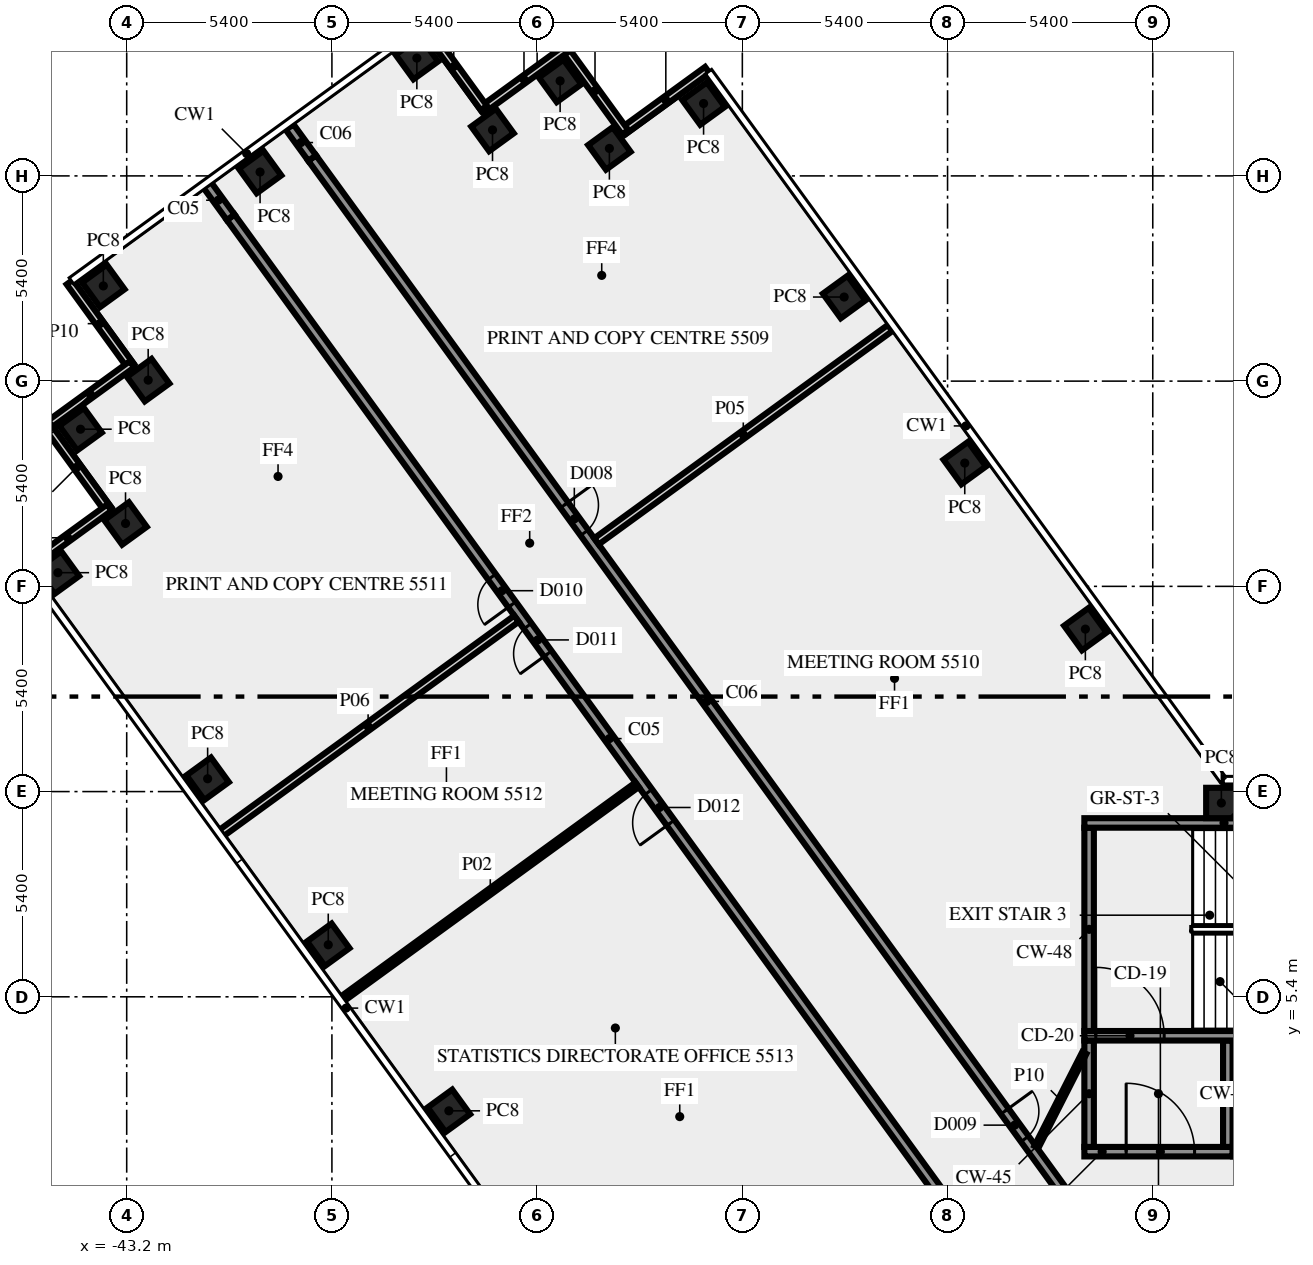
"""IFC4 building model, lengths in metres.
Left out: names, types, materials, properties, quantities, classifications, styles, units other than length and angle.
Written with IfcOpenShell. Run it as: python <this file> out.ifc"""

import sys

from ifc_helpers import new_model, si_unit, direction, frame, frame_2d, origin, origin_2d, place, context, subcontext, project, spatial, rectangle, extrude, element, fill, save


model = new_model("IFC4")
c1 = context("Model", 3, precision=1e-05, world=origin(), true_north=direction((0.0, 1.0)))
c2 = subcontext(c1, "Body", "Model", "MODEL_VIEW")
j1 = project(units=[si_unit("LENGTHUNIT", "METRE"), si_unit("PLANEANGLEUNIT", "RADIAN")], contexts=[c1])
p1 = place(None, origin())
s1 = spatial("IfcSite", under=j1, at=p1, CompositionType="ELEMENT")
p2 = place(p1, origin())
s2 = spatial("IfcBuilding", under=s1, at=p2, CompositionType="ELEMENT")
p3 = place(p2, frame((0.0, 0.0, 234.0)))
s3 = spatial("IfcBuildingStorey", under=s2, at=p3, CompositionType="ELEMENT", Elevation=234.0)
for number, where, z_axis, x_axis in (
    (1, (-17.974, 15.075, 0.0), (0.0, 0.0, 1.0), (-0.588, 0.809, 0.0)),
    (2, (-21.147, 19.444, 0.0), (0.0, 0.0, 1.0), (-0.588, 0.809, 0.0)),
    (3, (-24.321, 23.812, 0.0), (0.0, 0.0, 1.0), (-0.588, 0.809, 0.0)),
    (4, (-28.02, 28.905, 0.0), (0.0, 0.0, 1.0), (-0.809, -0.588, 0.0)),
    (5, (-30.499, 27.723, 0.0), (0.0, 0.0, 1.0), (-0.809, -0.588, 0.0)),
    (6, (-31.795, 29.5, 0.0), (0.0, 0.0, 1.0), (-0.588, 0.809, 0.0)),
    (7, (-33.574, 28.209, 0.0), (0.0, 0.0, 1.0), (-0.588, 0.809, 0.0)),
    (8, (-35.565, 30.1, 0.0), (0.0, 0.0, 1.0), (-0.809, -0.588, 0.0)),
    (9, (-39.691, 27.102, 0.0), (0.0, 0.0, 1.0), (-0.809, -0.588, 0.0)),
    (10, (-43.815, 24.105, 0.0), (0.0, 0.0, 1.0), (-0.809, -0.588, 0.0)),
    (11, (-42.635, 21.626, 0.0), (0.0, 0.0, 1.0), (-0.809, -0.588, 0.0)),
    (12, (-44.415, 20.335, 0.0), (0.0, 0.0, 1.0), (0.588, -0.809, 0.0)),
    (13, (-43.231, 17.854, 0.0), (0.0, 0.0, 1.0), (0.588, -0.809, 0.0)),
    (14, (-45.01, 16.56, 0.0), (0.0, 0.0, 1.0), (0.588, -0.809, 0.0)),
    (15, (-41.07, 11.137, 0.0), (0.0, 0.0, 1.0), (0.588, -0.809, 0.0)),
    (16, (-37.896, 6.769, 0.0), (0.0, 0.0, 1.0), (0.588, -0.809, 0.0)),
    (17, (-34.722, 2.4, 0.0), (0.0, 0.0, 1.0), (0.588, -0.809, 0.0)),
    (18, (-14.395, 10.5, 0.0), (0.0, 0.0, 1.0), (-1.0, 0.0, 0.0)),
):
    element("IfcColumn", number, at=place(p3, frame(where, z_axis=z_axis, x_axis=x_axis)), inside=s3, PredefinedType="COLUMN", context=c2, shape_type="SweptSolid", body=[
        extrude(rectangle(XDim=0.8, YDim=0.8, at=origin_2d()), origin(), (0.0, 0.0, 1.0), 3.65),
    ])
for number, where, z_axis, x_axis in (
    (19, (-27.921, 29.787, 0.0), (0.0, 0.0, 1.0), (-0.809, -0.588, 0.0)),
    (20, (-30.083, 28.149, 0.0), (0.0, 0.0, 1.0), (-0.588, 0.809, 0.0)),
    (21, (-31.654, 30.331, 0.0), (0.0, 0.0, 1.0), (-0.809, -0.588, 0.0)),
    (22, (-33.801, 28.786, 0.0), (0.0, 0.0, 1.0), (-0.588, 0.809, 0.0)),
    (23, (-44.699, 24.205, 0.0), (0.0, 0.0, 1.0), (0.588, -0.809, 0.0)),
    (24, (-43.061, 22.043, 0.0), (0.0, 0.0, 1.0), (-0.809, -0.588, 0.0)),
    (25, (-45.296, 20.434, 0.0), (0.0, 0.0, 1.0), (0.588, -0.809, 0.0)),
    (26, (-43.658, 18.272, 0.0), (0.0, 0.0, 1.0), (-0.809, -0.588, 0.0)),
):
    element("IfcWall", number, at=place(p3, frame(where, z_axis=z_axis, x_axis=x_axis)), inside=s3, PredefinedType="SOLIDWALL", context=c2, shape_type="SweptSolid", body=[
        extrude(rectangle(XDim=2.7, YDim=0.2, at=frame_2d((1.35, 0.0))), origin(), (0.0, 0.0, 1.0), 3.65),
    ])
p4 = place(p3, frame((-18.0, 1.325, 0.0), z_axis=(0.0, 0.0, 1.0), x_axis=(1.0, 0.0, 0.0)))
e27 = element("IfcWall", 27, at=p4, inside=s3, PredefinedType="SHEAR", context=c2, shape_type="SweptSolid", body=[
    extrude(rectangle(XDim=3.9, YDim=0.25, at=frame_2d((1.95, 0.0))), origin(), (0.0, 0.0, 1.0), 3.65),
])
p5 = place(p4, frame((1.1, 0.0, 0.0)))
e28 = element("IfcOpeningElement", 28, at=p5, cuts=e27, PredefinedType="OPENING", context=c2, shape_type="SweptSolid", body=[
    extrude(rectangle(XDim=1.8, YDim=2.1, at=frame_2d((0.9, 1.05))), frame((0.0, 0.135, 0.0), z_axis=(0.0, -1.0, 0.0), x_axis=(1.0, 0.0, 0.0)), (0.0, 0.0, 1.0), 0.27),
])
for number, where, z_axis, x_axis in (
    (29, (-17.875, 1.45, 0.0), (0.0, 0.0, 1.0), (0.0, 1.0, 0.0)),
    (30, (-14.225, 1.45, 0.0), (0.0, 0.0, 1.0), (0.0, 1.0, 0.0)),
):
    element("IfcWall", number, at=place(p3, frame(where, z_axis=z_axis, x_axis=x_axis)), inside=s3, PredefinedType="SHEAR", context=c2, shape_type="SweptSolid", body=[
        extrude(rectangle(XDim=2.8, YDim=0.25, at=frame_2d((1.4, 0.0))), origin(), (0.0, 0.0, 1.0), 3.65),
    ])
p6 = place(p3, frame((-18.0, 4.375, 0.0), z_axis=(0.0, 0.0, 1.0), x_axis=(1.0, 0.0, 0.0)))
e31 = element("IfcWall", 31, at=p6, inside=s3, PredefinedType="SHEAR", context=c2, shape_type="SweptSolid", body=[
    extrude(rectangle(XDim=10.5, YDim=0.25, at=frame_2d((5.25, 0.0))), origin(), (0.0, 0.0, 1.0), 3.65),
])
p7 = place(p6, frame((0.3, 0.0, 0.0)))
e32 = element("IfcOpeningElement", 32, at=p7, cuts=e31, PredefinedType="OPENING", context=c2, shape_type="SweptSolid", body=[
    extrude(rectangle(XDim=1.8, YDim=2.1, at=frame_2d((0.9, 1.05))), frame((0.0, 0.135, 0.0), z_axis=(0.0, -1.0, 0.0), x_axis=(1.0, 0.0, 0.0)), (0.0, 0.0, 1.0), 0.27),
])
p8 = place(p3, frame((-17.875, 4.5, 0.0), z_axis=(0.0, 0.0, 1.0), x_axis=(0.0, 1.0, 0.0)))
e33 = element("IfcWall", 33, at=p8, inside=s3, PredefinedType="SHEAR", context=c2, shape_type="SweptSolid", body=[
    extrude(rectangle(XDim=5.35, YDim=0.25, at=frame_2d((2.675, 0.0))), origin(), (0.0, 0.0, 1.0), 3.65),
])
p9 = place(p3, frame((-18.0, 9.975, 0.0), z_axis=(0.0, 0.0, 1.0), x_axis=(1.0, 0.0, 0.0)))
e34 = element("IfcWall", 34, at=p9, inside=s3, PredefinedType="SHEAR", context=c2, shape_type="SweptSolid", body=[
    extrude(rectangle(XDim=10.5, YDim=0.25, at=frame_2d((5.25, 0.0))), origin(), (0.0, 0.0, 1.0), 3.65),
])
p10 = place(p9, frame((4.5, 0.0, 1.0)))
e35 = element("IfcOpeningElement", 35, at=p10, cuts=e34, PredefinedType="OPENING", context=c2, shape_type="SweptSolid", body=[
    extrude(rectangle(XDim=1.2, YDim=1.2, at=frame_2d((0.6, 0.6))), frame((0.0, 0.135, 0.0), z_axis=(0.0, -1.0, 0.0), x_axis=(1.0, 0.0, 0.0)), (0.0, 0.0, 1.0), 0.27),
])
p11 = place(p3, frame((-20.531, -1.523, 0.0), z_axis=(0.0, 0.0, 1.0), x_axis=(-0.587781654618, 0.809019608226, 0.0)))
e36 = element("IfcWall", 36, at=p11, inside=s3, PredefinedType="SOLIDWALL", context=c2, shape_type="SweptSolid", body=[
    extrude(rectangle(XDim=33.911, YDim=0.25, at=frame_2d((16.956, 0.0))), origin(), (0.0, 0.0, 1.0), 3.65),
])
p12 = place(p11, frame((14.216, 0.0, 0.0)))
e37 = element("IfcOpeningElement", 37, at=p12, cuts=e36, PredefinedType="OPENING", context=c2, shape_type="SweptSolid", body=[
    extrude(rectangle(XDim=1.0, YDim=2.1, at=frame_2d((0.5, 1.05))), frame((0.0, 0.135, 0.0), z_axis=(0.0, -1.0, 0.0), x_axis=(1.0, 0.0, 0.0)), (0.0, 0.0, 1.0), 0.27),
])
p13 = place(p11, frame((19.715, 0.0, 0.0)))
e38 = element("IfcOpeningElement", 38, at=p13, cuts=e36, PredefinedType="OPENING", context=c2, shape_type="SweptSolid", body=[
    extrude(rectangle(XDim=0.9, YDim=2.1, at=frame_2d((0.45, 1.05))), frame((0.0, 0.135, 0.0), z_axis=(0.0, -1.0, 0.0), x_axis=(1.0, 0.0, 0.0)), (0.0, 0.0, 1.0), 0.27),
])
p14 = place(p11, frame((21.316, 0.0, 0.0)))
e39 = element("IfcOpeningElement", 39, at=p14, cuts=e36, PredefinedType="OPENING", context=c2, shape_type="SweptSolid", body=[
    extrude(rectangle(XDim=0.9, YDim=2.1, at=frame_2d((0.45, 1.05))), frame((0.0, 0.135, 0.0), z_axis=(0.0, -1.0, 0.0), x_axis=(1.0, 0.0, 0.0)), (0.0, 0.0, 1.0), 0.27),
])
p15 = place(p3, frame((-38.32, 27.469, 0.0), z_axis=(0.0, 0.0, 1.0), x_axis=(0.587788021768, -0.809014982226, 0.0)))
e40 = element("IfcWall", 40, at=p15, inside=s3, PredefinedType="SOLIDWALL", context=c2, shape_type="SweptSolid", body=[
    extrude(rectangle(XDim=35.344, YDim=0.25, at=frame_2d((17.672, 0.0))), origin(), (0.0, 0.0, 1.0), 3.65),
])
p16 = place(p15, frame((31.003, 0.0, 0.0)))
e41 = element("IfcOpeningElement", 41, at=p16, cuts=e40, PredefinedType="OPENING", context=c2, shape_type="SweptSolid", body=[
    extrude(rectangle(XDim=0.9, YDim=2.1, at=frame_2d((0.45, 1.05))), frame((0.0, 0.135, 0.0), z_axis=(0.0, -1.0, 0.0), x_axis=(1.0, 0.0, 0.0)), (0.0, 0.0, 1.0), 0.27),
])
p17 = place(p15, frame((11.286, 0.0, 0.0)))
e42 = element("IfcOpeningElement", 42, at=p17, cuts=e40, PredefinedType="OPENING", context=c2, shape_type="SweptSolid", body=[
    extrude(rectangle(XDim=0.9, YDim=2.1, at=frame_2d((0.45, 1.05))), frame((0.0, 0.135, 0.0), z_axis=(0.0, -1.0, 0.0), x_axis=(1.0, 0.0, 0.0)), (0.0, 0.0, 1.0), 0.27),
])
p18 = place(p3, frame((-29.769, 10.98, 0.0), z_axis=(0.0, 0.0, 1.0), x_axis=(-0.809048817734, -0.587741448702, 0.0)))
e43 = element("IfcWall", 43, at=p18, inside=s3, PredefinedType="PARTITIONING", context=c2, shape_type="SweptSolid", body=[
    extrude(rectangle(XDim=9.55, YDim=0.15, at=frame_2d((4.775, 0.0))), origin(), (0.0, 0.0, 1.0), 2.85),
])
p19 = place(p3, frame((-23.112, 22.998, 0.0), z_axis=(0.0, 0.0, 1.0), x_axis=(-0.809043311713, -0.587749027879, 0.0)))
e44 = element("IfcWall", 44, at=p19, inside=s3, PredefinedType="SOLIDWALL", context=c2, shape_type="SweptSolid", body=[
    extrude(rectangle(XDim=9.55, YDim=0.2, at=frame_2d((4.775, 0.0))), origin(), (0.0, 0.0, 1.0), 2.85),
])
p20 = place(p3, frame((-32.943, 15.349, 0.0), z_axis=(0.0, 0.0, 1.0), x_axis=(-0.80903787798, -0.587756507402, 0.0)))
e45 = element("IfcWall", 45, at=p20, inside=s3, PredefinedType="SOLIDWALL", context=c2, shape_type="SweptSolid", body=[
    extrude(rectangle(XDim=9.652, YDim=0.2, at=frame_2d((4.826, 0.0))), origin(), (0.0, 0.0, 1.0), 2.85),
])
p21 = place(p3, frame((-19.261, 1.45, 0.0), z_axis=(0.0, 0.0, 1.0), x_axis=(0.453950796792, 0.891026752736, 0.0)))
e46 = element("IfcWall", 46, at=p21, inside=s3, PredefinedType="PARTITIONING", context=c2, shape_type="SweptSolid", body=[
    extrude(rectangle(XDim=2.778, YDim=0.12, at=frame_2d((1.389, 0.0))), origin(), (0.0, 0.0, 1.0), 3.65),
])
p22 = place(p3, frame((-40.463, 25.911, 0.0), z_axis=(0.0, 0.0, 1.0), x_axis=(-0.587792454268, 0.809011761785, 0.0)))
e47 = element("IfcWall", 47, at=p22, inside=s3, PredefinedType="SOLIDWALL", context=c2, shape_type="SweptSolid", body=[
    extrude(rectangle(XDim=1.11, YDim=0.25, at=frame_2d((0.555, 0.0))), origin(), (0.0, 0.0, 1.0), 2.85),
])
p23 = place(p3, frame((-38.32, 27.469, 0.0), z_axis=(0.0, 0.0, 1.0), x_axis=(-0.587811913486, 0.808997623213, 0.0)))
e48 = element("IfcWall", 48, at=p23, inside=s3, PredefinedType="SOLIDWALL", context=c2, shape_type="SweptSolid", body=[
    extrude(rectangle(XDim=1.009, YDim=0.25, at=frame_2d((0.504, 0.0))), origin(), (0.0, 0.0, 1.0), 2.85),
])
p24 = place(p5, origin())
e49 = element("IfcDoor", 49, at=p24, inside=s3, OperationType="DOUBLE_DOOR_SINGLE_SWING", PredefinedType="DOOR", context=c2, shape_type="SweptSolid", body=[
    extrude(rectangle(XDim=1.8, YDim=2.1, at=frame_2d((0.9, 1.05))), frame((0.0, 0.025, 0.0), z_axis=(0.0, -1.0, 0.0), x_axis=(1.0, 0.0, 0.0)), (0.0, 0.0, 1.0), 0.05),
])
fill(e28, e49)
p25 = place(p7, origin())
e50 = element("IfcDoor", 50, at=p25, inside=s3, OperationType="DOUBLE_DOOR_SINGLE_SWING", PredefinedType="DOOR", context=c2, shape_type="SweptSolid", body=[
    extrude(rectangle(XDim=1.8, YDim=2.1, at=frame_2d((0.9, 1.05))), frame((0.0, 0.025, 0.0), z_axis=(0.0, -1.0, 0.0), x_axis=(1.0, 0.0, 0.0)), (0.0, 0.0, 1.0), 0.05),
])
fill(e32, e50)
p26 = place(p12, origin())
e51 = element("IfcDoor", 51, at=p26, inside=s3, OperationType="SINGLE_SWING_RIGHT", PredefinedType="DOOR", context=c2, shape_type="SweptSolid", body=[
    extrude(rectangle(XDim=1.0, YDim=2.1, at=frame_2d((0.5, 1.05))), frame((0.0, 0.025, 0.0), z_axis=(0.0, -1.0, 0.0), x_axis=(1.0, 0.0, 0.0)), (0.0, 0.0, 1.0), 0.05),
])
fill(e37, e51)
p27 = place(p16, origin())
e52 = element("IfcDoor", 52, at=p27, inside=s3, OperationType="SINGLE_SWING_RIGHT", PredefinedType="DOOR", context=c2, shape_type="SweptSolid", body=[
    extrude(rectangle(XDim=0.9, YDim=2.1, at=frame_2d((0.45, 1.05))), frame((0.0, 0.025, 0.0), z_axis=(0.0, -1.0, 0.0), x_axis=(1.0, 0.0, 0.0)), (0.0, 0.0, 1.0), 0.05),
])
fill(e41, e52)
p28 = place(p13, origin())
e53 = element("IfcDoor", 53, at=p28, inside=s3, OperationType="SINGLE_SWING_RIGHT", PredefinedType="DOOR", context=c2, shape_type="SweptSolid", body=[
    extrude(rectangle(XDim=0.9, YDim=2.1, at=frame_2d((0.45, 1.05))), frame((0.0, 0.025, 0.0), z_axis=(0.0, -1.0, 0.0), x_axis=(1.0, 0.0, 0.0)), (0.0, 0.0, 1.0), 0.05),
])
fill(e38, e53)
p29 = place(p17, origin())
e54 = element("IfcDoor", 54, at=p29, inside=s3, OperationType="SINGLE_SWING_RIGHT", PredefinedType="DOOR", context=c2, shape_type="SweptSolid", body=[
    extrude(rectangle(XDim=0.9, YDim=2.1, at=frame_2d((0.45, 1.05))), frame((0.0, 0.025, 0.0), z_axis=(0.0, -1.0, 0.0), x_axis=(1.0, 0.0, 0.0)), (0.0, 0.0, 1.0), 0.05),
])
fill(e42, e54)
p30 = place(p14, origin())
e55 = element("IfcDoor", 55, at=p30, inside=s3, OperationType="SINGLE_SWING_LEFT", PredefinedType="DOOR", context=c2, shape_type="SweptSolid", body=[
    extrude(rectangle(XDim=0.9, YDim=2.1, at=frame_2d((0.45, 1.05))), frame((0.0, 0.025, 0.0), z_axis=(0.0, -1.0, 0.0), x_axis=(1.0, 0.0, 0.0)), (0.0, 0.0, 1.0), 0.05),
])
fill(e39, e55)
save(model, sys.argv[1])
